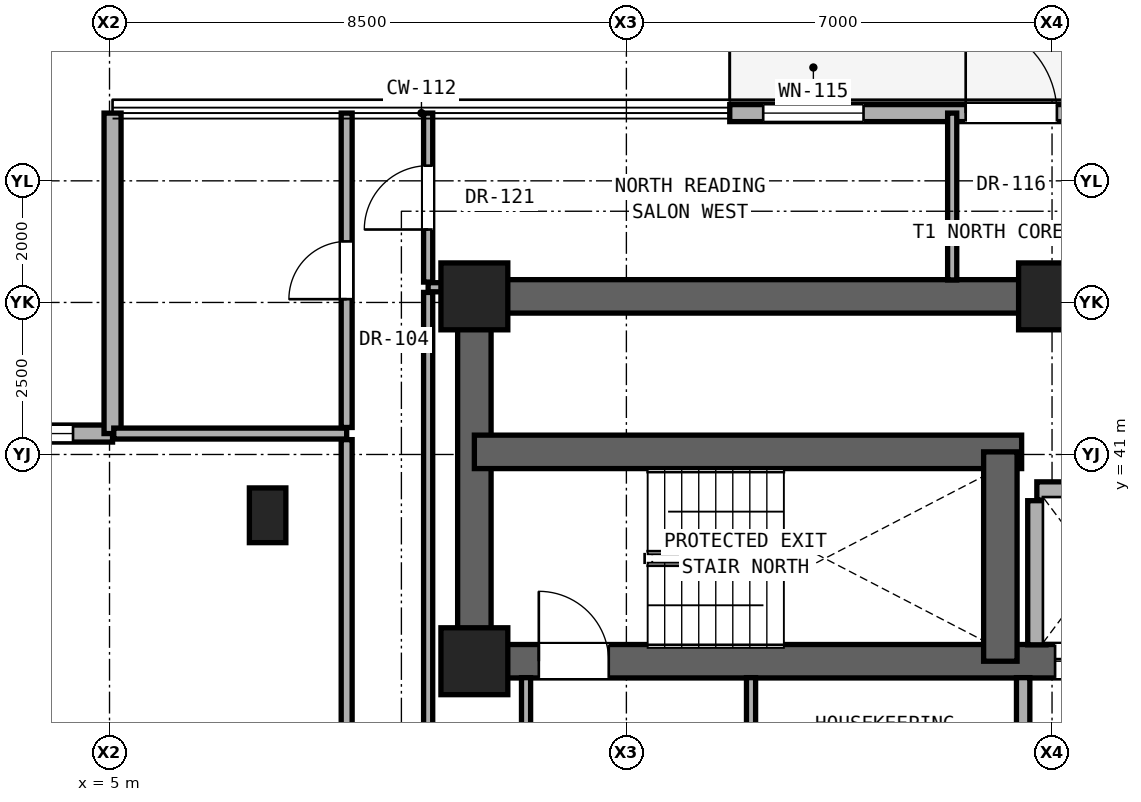
"""IFC4 building model, lengths in metres.
Left out: names, types, materials, properties, quantities, classifications, styles, units other than length and angle.
Written with IfcOpenShell. Run it as: python <this file> out.ifc"""

import sys

from ifc_helpers import new_model, si_unit, direction, frame, frame_2d, origin, origin_2d, place, context, subcontext, project, spatial, rectangle, extrude, element, fill, save


model = new_model("IFC4")
c1 = context("Model", 3, precision=1e-05, world=origin(), true_north=direction((0.0, 1.0)))
c2 = subcontext(c1, "Body", "Model", "MODEL_VIEW")
j1 = project(units=[si_unit("LENGTHUNIT", "METRE"), si_unit("PLANEANGLEUNIT", "RADIAN")], contexts=[c1])
p1 = place(None, origin())
s1 = spatial("IfcSite", under=j1, at=p1, CompositionType="ELEMENT")
p2 = place(p1, origin())
s2 = spatial("IfcBuilding", under=s1, at=p2, CompositionType="ELEMENT")
p3 = place(p2, frame((0.0, 0.0, 128.0)))
s3 = spatial("IfcBuildingStorey", under=s2, at=p3, CompositionType="ELEMENT", Elevation=128.0)
for number, where, z_axis, x_axis in (
    (1, (11.0, 37.6, 0.0), (0.0, 0.0, 1.0), (1.0, 0.0, 0.0)),
    (2, (11.0, 43.6, 0.0), (0.0, 0.0, 1.0), (1.0, 0.0, 0.0)),
    (3, (20.5, 43.6, 0.0), (0.0, 0.0, 1.0), (1.0, 0.0, 0.0)),
):
    element("IfcColumn", number, at=place(p3, frame(where, z_axis=z_axis, x_axis=x_axis)), inside=s3, PredefinedType="COLUMN", context=c2, shape_type="SweptSolid", body=[
        extrude(rectangle(XDim=1.1, YDim=1.1, at=origin_2d()), origin(), (0.0, 0.0, 1.0), 3.3),
    ])
p4 = place(p3, frame((7.6, 40.0, 0.0), z_axis=(0.0, 0.0, 1.0), x_axis=(1.0, 0.0, 0.0)))
e4 = element("IfcColumn", 4, at=p4, inside=s3, PredefinedType="PILASTER", context=c2, shape_type="SweptSolid", body=[
    extrude(rectangle(XDim=0.6, YDim=0.9, at=origin_2d()), origin(), (0.0, 0.0, 1.0), 3.3),
])
p5 = place(p3, frame((11.0, 43.6, 0.0), z_axis=(0.0, 0.0, 1.0), x_axis=(1.0, 0.0, 0.0)))
e5 = element("IfcWall", 5, at=p5, inside=s3, PredefinedType="SHEAR", context=c2, shape_type="SweptSolid", body=[
    extrude(rectangle(XDim=19.0, YDim=0.55, at=frame_2d((9.5, 0.0))), origin(), (0.0, 0.0, 1.0), 3.08),
])
p6 = place(p3, frame((11.0, 37.6, 0.0), z_axis=(0.0, 0.0, 1.0), x_axis=(0.0, 1.0, 0.0)))
e6 = element("IfcWall", 6, at=p6, inside=s3, PredefinedType="SHEAR", context=c2, shape_type="SweptSolid", body=[
    extrude(rectangle(XDim=6.0, YDim=0.55, at=frame_2d((3.0, 0.0))), origin(), (0.0, 0.0, 1.0), 3.08),
])
p7 = place(p3, frame((11.0, 37.6, 0.0), z_axis=(0.0, 0.0, 1.0), x_axis=(1.0, 0.0, 0.0)))
e7 = element("IfcWall", 7, at=p7, inside=s3, PredefinedType="SHEAR", context=c2, shape_type="SweptSolid", body=[
    extrude(rectangle(XDim=19.0, YDim=0.55, at=frame_2d((9.5, 0.0))), origin(), (0.0, 0.0, 1.0), 3.08),
])
p8 = place(p7, frame((1.06, 0.0, 0.0)))
e8 = element("IfcOpeningElement", 8, at=p8, cuts=e7, PredefinedType="OPENING", context=c2, shape_type="SweptSolid", body=[
    extrude(rectangle(XDim=1.15, YDim=2.2, at=frame_2d((0.575, 1.1))), frame((0.0, 0.285, 0.0), z_axis=(0.0, -1.0, 0.0), x_axis=(1.0, 0.0, 0.0)), (0.0, 0.0, 1.0), 0.57),
])
p9 = place(p7, frame((9.55, 0.0, 0.0)))
e9 = element("IfcOpeningElement", 9, at=p9, cuts=e7, PredefinedType="OPENING", context=c2, shape_type="SweptSolid", body=[
    extrude(rectangle(XDim=1.4, YDim=2.35, at=frame_2d((0.7, 1.175))), frame((0.0, 0.285, 0.0), z_axis=(0.0, -1.0, 0.0), x_axis=(1.0, 0.0, 0.0)), (0.0, 0.0, 1.0), 0.57),
])
p10 = place(p7, frame((11.95, 0.0, 0.0)))
e10 = element("IfcOpeningElement", 10, at=p10, cuts=e7, PredefinedType="OPENING", context=c2, shape_type="SweptSolid", body=[
    extrude(rectangle(XDim=1.4, YDim=2.35, at=frame_2d((0.7, 1.175))), frame((0.0, 0.285, 0.0), z_axis=(0.0, -1.0, 0.0), x_axis=(1.0, 0.0, 0.0)), (0.0, 0.0, 1.0), 0.57),
])
p11 = place(p3, frame((11.0, 41.043, 0.0), z_axis=(0.0, 0.0, 1.0), x_axis=(1.0, 0.0, 0.0)))
e11 = element("IfcWall", 11, at=p11, inside=s3, PredefinedType="SHEAR", context=c2, shape_type="SweptSolid", body=[
    extrude(rectangle(XDim=9.0, YDim=0.55, at=frame_2d((4.5, 0.0))), origin(), (0.0, 0.0, 1.0), 3.08),
])
p12 = place(p3, frame((19.65, 37.6, 0.0), z_axis=(0.0, 0.0, 1.0), x_axis=(0.0, 1.0, 0.0)))
e12 = element("IfcWall", 12, at=p12, inside=s3, PredefinedType="SHEAR", context=c2, shape_type="SweptSolid", body=[
    extrude(rectangle(XDim=3.443, YDim=0.55, at=frame_2d((1.721, 0.0))), origin(), (0.0, 0.0, 1.0), 3.08),
])
p13 = place(p3, frame((15.2, 46.614, 0.0), z_axis=(0.0, 0.0, 1.0), x_axis=(1.0, 0.0, 0.0)))
e13 = element("IfcWall", 13, at=p13, inside=s3, PredefinedType="SOLIDWALL", context=c2, shape_type="SweptSolid", body=[
    extrude(rectangle(XDim=10.6, YDim=0.28, at=frame_2d((5.3, 0.0))), origin(), (0.0, 0.0, 1.0), 3.04),
])
p14 = place(p13, frame((0.55, 0.0, 0.69)))
e14 = element("IfcOpeningElement", 14, at=p14, cuts=e13, PredefinedType="OPENING", context=c2, shape_type="SweptSolid", body=[
    extrude(rectangle(XDim=1.65, YDim=2.2, at=frame_2d((0.825, 1.1))), frame((0.0, 0.15, 0.0), z_axis=(0.0, -1.0, 0.0), x_axis=(1.0, 0.0, 0.0)), (0.0, 0.0, 1.0), 0.3),
])
p15 = place(p13, frame((3.88, 0.0, 0.0)))
e15 = element("IfcOpeningElement", 15, at=p15, cuts=e13, PredefinedType="OPENING", context=c2, shape_type="SweptSolid", body=[
    extrude(rectangle(XDim=1.5, YDim=2.3, at=frame_2d((0.75, 1.15))), frame((0.0, 0.15, 0.0), z_axis=(0.0, -1.0, 0.0), x_axis=(1.0, 0.0, 0.0)), (0.0, 0.0, 1.0), 0.3),
])
p16 = place(p3, frame((5.05, 41.344, 0.0), z_axis=(0.0, 0.0, 1.0), x_axis=(-1.0, 0.0, 0.0)))
e16 = element("IfcWall", 16, at=p16, inside=s3, PredefinedType="SOLIDWALL", context=c2, shape_type="SweptSolid", body=[
    extrude(rectangle(XDim=5.27, YDim=0.28, at=frame_2d((2.635, 0.0))), origin(), (0.0, 0.0, 1.0), 3.06),
])
p17 = place(p16, frame((0.65, 0.0, 0.85)))
e17 = element("IfcOpeningElement", 17, at=p17, cuts=e16, PredefinedType="OPENING", context=c2, shape_type="SweptSolid", body=[
    extrude(rectangle(XDim=1.1, YDim=2.0, at=frame_2d((0.55, 1.0))), frame((0.0, 0.15, 0.0), z_axis=(0.0, -1.0, 0.0), x_axis=(1.0, 0.0, 0.0)), (0.0, 0.0, 1.0), 0.3),
])
p18 = place(p3, frame((5.05, 46.614, 0.0), z_axis=(0.0, 0.0, 1.0), x_axis=(0.0, -1.0, 0.0)))
e18 = element("IfcWall", 18, at=p18, inside=s3, PredefinedType="SOLIDWALL", context=c2, shape_type="SweptSolid", body=[
    extrude(rectangle(XDim=5.27, YDim=0.28, at=frame_2d((2.635, 0.0))), origin(), (0.0, 0.0, 1.0), 3.06),
])
p19 = place(p3, frame((20.25, 40.4, 0.0), z_axis=(0.0, 0.0, 1.0), x_axis=(1.0, 0.0, 0.0)))
e19 = element("IfcWall", 19, at=p19, inside=s3, PredefinedType="SOLIDWALL", context=c2, shape_type="SweptSolid", body=[
    extrude(rectangle(XDim=4.4, YDim=0.3, at=frame_2d((2.2, 0.0))), origin(), (0.0, 0.0, 1.0), 3.08),
])
p20 = place(p3, frame((5.07, 41.344, 0.0), z_axis=(0.0, 0.0, 1.0), x_axis=(1.0, 0.0, 0.0)))
e20 = element("IfcWall", 20, at=p20, inside=s3, PredefinedType="PARTITIONING", context=c2, shape_type="SweptSolid", body=[
    extrude(rectangle(XDim=3.83, YDim=0.18, at=frame_2d((1.915, 0.0))), origin(), (0.0, 0.0, 1.0), 3.08),
])
p21 = place(p3, frame((10.24, 43.75, 0.0), z_axis=(0.0, 0.0, 1.0), x_axis=(1.0, 0.0, 0.0)))
e21 = element("IfcWall", 21, at=p21, inside=s3, PredefinedType="PARTITIONING", context=c2, shape_type="SweptSolid", body=[
    extrude(rectangle(XDim=0.49, YDim=0.15, at=frame_2d((0.245, 0.0))), origin(), (0.0, 0.0, 1.0), 3.08),
])
p22 = place(p3, frame((8.9, 28.193, 0.0), z_axis=(0.0, 0.0, 1.0), x_axis=(0.0, 1.0, 0.0)))
e22 = element("IfcWall", 22, at=p22, inside=s3, PredefinedType="PARTITIONING", context=c2, shape_type="SweptSolid", body=[
    extrude(rectangle(XDim=13.051, YDim=0.18, at=frame_2d((6.525, 0.0))), origin(), (0.0, 0.0, 1.0), 2.299),
])
p23 = place(p22, frame((6.0, 0.0, 0.0)))
e23 = element("IfcOpeningElement", 23, at=p23, cuts=e22, PredefinedType="OPENING", context=c2, shape_type="SweptSolid", body=[
    extrude(rectangle(XDim=1.05, YDim=2.2, at=frame_2d((0.525, 1.1))), frame((0.0, 0.1, 0.0), z_axis=(0.0, -1.0, 0.0), x_axis=(1.0, 0.0, 0.0)), (0.0, 0.0, 1.0), 0.2),
])
p24 = place(p3, frame((8.9, 41.444, 0.0), z_axis=(0.0, 0.0, 1.0), x_axis=(0.0, 1.0, 0.0)))
e24 = element("IfcWall", 24, at=p24, inside=s3, PredefinedType="PARTITIONING", context=c2, shape_type="SweptSolid", body=[
    extrude(rectangle(XDim=5.17, YDim=0.18, at=frame_2d((2.585, 0.0))), origin(), (0.0, 0.0, 1.0), 3.08),
])
p25 = place(p24, frame((2.11, 0.0, 0.0)))
e25 = element("IfcOpeningElement", 25, at=p25, cuts=e24, PredefinedType="OPENING", context=c2, shape_type="SweptSolid", body=[
    extrude(rectangle(XDim=0.95, YDim=2.15, at=frame_2d((0.475, 1.075))), frame((0.0, 0.1, 0.0), z_axis=(0.0, -1.0, 0.0), x_axis=(1.0, 0.0, 0.0)), (0.0, 0.0, 1.0), 0.2),
])
p26 = place(p3, frame((10.24, 34.535, 0.0), z_axis=(0.0, 0.0, 1.0), x_axis=(0.0, 1.0, 0.0)))
e26 = element("IfcWall", 26, at=p26, inside=s3, PredefinedType="PARTITIONING", context=c2, shape_type="SweptSolid", body=[
    extrude(rectangle(XDim=9.13, YDim=0.15, at=frame_2d((4.565, 0.0))), origin(), (0.0, 0.0, 1.0), 2.456),
])
p27 = place(p3, frame((10.24, 43.835, 0.0), z_axis=(0.0, 0.0, 1.0), x_axis=(0.0, 1.0, 0.0)))
e27 = element("IfcWall", 27, at=p27, inside=s3, PredefinedType="PARTITIONING", context=c2, shape_type="SweptSolid", body=[
    extrude(rectangle(XDim=2.779, YDim=0.15, at=frame_2d((1.39, 0.0))), origin(), (0.0, 0.0, 1.0), 3.08),
])
p28 = place(p27, frame((0.865, 0.0, 0.0)))
e28 = element("IfcOpeningElement", 28, at=p28, cuts=e27, PredefinedType="OPENING", context=c2, shape_type="SweptSolid", body=[
    extrude(rectangle(XDim=1.05, YDim=2.2, at=frame_2d((0.525, 1.1))), frame((0.0, 0.085, 0.0), z_axis=(0.0, -1.0, 0.0), x_axis=(1.0, 0.0, 0.0)), (0.0, 0.0, 1.0), 0.17),
])
p29 = place(p3, frame((11.85, 34.535, 0.0), z_axis=(0.0, 0.0, 1.0), x_axis=(0.0, 1.0, 0.0)))
e29 = element("IfcWall", 29, at=p29, inside=s3, PredefinedType="PARTITIONING", context=c2, shape_type="SweptSolid", body=[
    extrude(rectangle(XDim=2.795, YDim=0.15, at=frame_2d((1.397, 0.0))), origin(), (0.0, 0.0, 1.0), 3.08),
])
p30 = place(p3, frame((15.55, 34.57, 0.0), z_axis=(0.0, 0.0, 1.0), x_axis=(0.0, 1.0, 0.0)))
e30 = element("IfcWall", 30, at=p30, inside=s3, PredefinedType="PARTITIONING", context=c2, shape_type="SweptSolid", body=[
    extrude(rectangle(XDim=2.76, YDim=0.15, at=frame_2d((1.38, 0.0))), origin(), (0.0, 0.0, 1.0), 2.609),
])
p31 = place(p3, frame((18.858, 43.87, 0.0), z_axis=(0.0, 0.0, 1.0), x_axis=(0.0, 1.0, 0.0)))
e31 = element("IfcWall", 31, at=p31, inside=s3, PredefinedType="PARTITIONING", context=c2, shape_type="SweptSolid", body=[
    extrude(rectangle(XDim=2.744, YDim=0.15, at=frame_2d((1.372, 0.0))), origin(), (0.0, 0.0, 1.0), 3.08),
])
p32 = place(p3, frame((20.025, 34.57, 0.0), z_axis=(0.0, 0.0, 1.0), x_axis=(0.0, 1.0, 0.0)))
e32 = element("IfcWall", 32, at=p32, inside=s3, PredefinedType="SOLIDWALL", context=c2, shape_type="SweptSolid", body=[
    extrude(rectangle(XDim=2.76, YDim=0.22, at=frame_2d((1.38, 0.0))), origin(), (0.0, 0.0, 1.0), 3.08),
])
p33 = place(p3, frame((20.25, 37.87, 0.0), z_axis=(0.0, 0.0, 1.0), x_axis=(0.0, 1.0, 0.0)))
e33 = element("IfcWall", 33, at=p33, inside=s3, PredefinedType="SOLIDWALL", context=c2, shape_type="SweptSolid", body=[
    extrude(rectangle(XDim=2.37, YDim=0.3, at=frame_2d((1.185, 0.0))), origin(), (0.0, 0.0, 1.0), 3.08),
])
p34 = place(p14, origin())
e34 = element("IfcWindow", 34, at=p34, inside=s3, PartitioningType="SINGLE_PANEL", PredefinedType="WINDOW", context=c2, shape_type="SweptSolid", body=[
    extrude(rectangle(XDim=1.65, YDim=2.2, at=frame_2d((0.825, 1.1))), frame((0.0, 0.03, 0.0), z_axis=(0.0, -1.0, 0.0), x_axis=(1.0, 0.0, 0.0)), (0.0, 0.0, 1.0), 0.06),
])
fill(e14, e34)
p35 = place(p15, origin())
e35 = element("IfcDoor", 35, at=p35, inside=s3, OperationType="SINGLE_SWING_LEFT", PredefinedType="DOOR", context=c2, shape_type="SweptSolid", body=[
    extrude(rectangle(XDim=1.5, YDim=2.3, at=frame_2d((0.75, 1.15))), frame((0.0, 0.025, 0.0), z_axis=(0.0, -1.0, 0.0), x_axis=(1.0, 0.0, 0.0)), (0.0, 0.0, 1.0), 0.05),
])
fill(e15, e35)
p36 = place(p17, origin())
e36 = element("IfcWindow", 36, at=p36, inside=s3, PartitioningType="SINGLE_PANEL", PredefinedType="WINDOW", context=c2, shape_type="SweptSolid", body=[
    extrude(rectangle(XDim=1.1, YDim=2.0, at=frame_2d((0.55, 1.0))), frame((0.0, 0.03, 0.0), z_axis=(0.0, -1.0, 0.0), x_axis=(1.0, 0.0, 0.0)), (0.0, 0.0, 1.0), 0.06),
])
fill(e17, e36)
p37 = place(p8, origin())
e37 = element("IfcDoor", 37, at=p37, inside=s3, OperationType="SINGLE_SWING_LEFT", PredefinedType="DOOR", context=c2, shape_type="SweptSolid", body=[
    extrude(rectangle(XDim=1.15, YDim=2.2, at=frame_2d((0.575, 1.1))), frame((0.0, 0.025, 0.0), z_axis=(0.0, -1.0, 0.0), x_axis=(1.0, 0.0, 0.0)), (0.0, 0.0, 1.0), 0.05),
])
fill(e8, e37)
p38 = place(p28, origin())
e38 = element("IfcDoor", 38, at=p38, inside=s3, OperationType="SINGLE_SWING_LEFT", PredefinedType="DOOR", context=c2, shape_type="SweptSolid", body=[
    extrude(rectangle(XDim=1.05, YDim=2.2, at=frame_2d((0.525, 1.1))), frame((0.0, 0.025, 0.0), z_axis=(0.0, -1.0, 0.0), x_axis=(1.0, 0.0, 0.0)), (0.0, 0.0, 1.0), 0.05),
])
fill(e28, e38)
p39 = place(p25, origin())
e39 = element("IfcDoor", 39, at=p39, inside=s3, OperationType="SINGLE_SWING_LEFT", PredefinedType="DOOR", context=c2, shape_type="SweptSolid", body=[
    extrude(rectangle(XDim=0.95, YDim=2.15, at=frame_2d((0.475, 1.075))), frame((0.0, 0.025, 0.0), z_axis=(0.0, -1.0, 0.0), x_axis=(1.0, 0.0, 0.0)), (0.0, 0.0, 1.0), 0.05),
])
fill(e25, e39)
p40 = place(p9, origin())
e40 = element("IfcDoor", 40, at=p40, inside=s3, OperationType="DOUBLE_DOOR_SLIDING", PredefinedType="DOOR", context=c2, shape_type="SweptSolid", body=[
    extrude(rectangle(XDim=1.4, YDim=2.35, at=frame_2d((0.7, 1.175))), frame((0.0, 0.025, 0.0), z_axis=(0.0, -1.0, 0.0), x_axis=(1.0, 0.0, 0.0)), (0.0, 0.0, 1.0), 0.05),
])
fill(e9, e40)
save(model, sys.argv[1])
